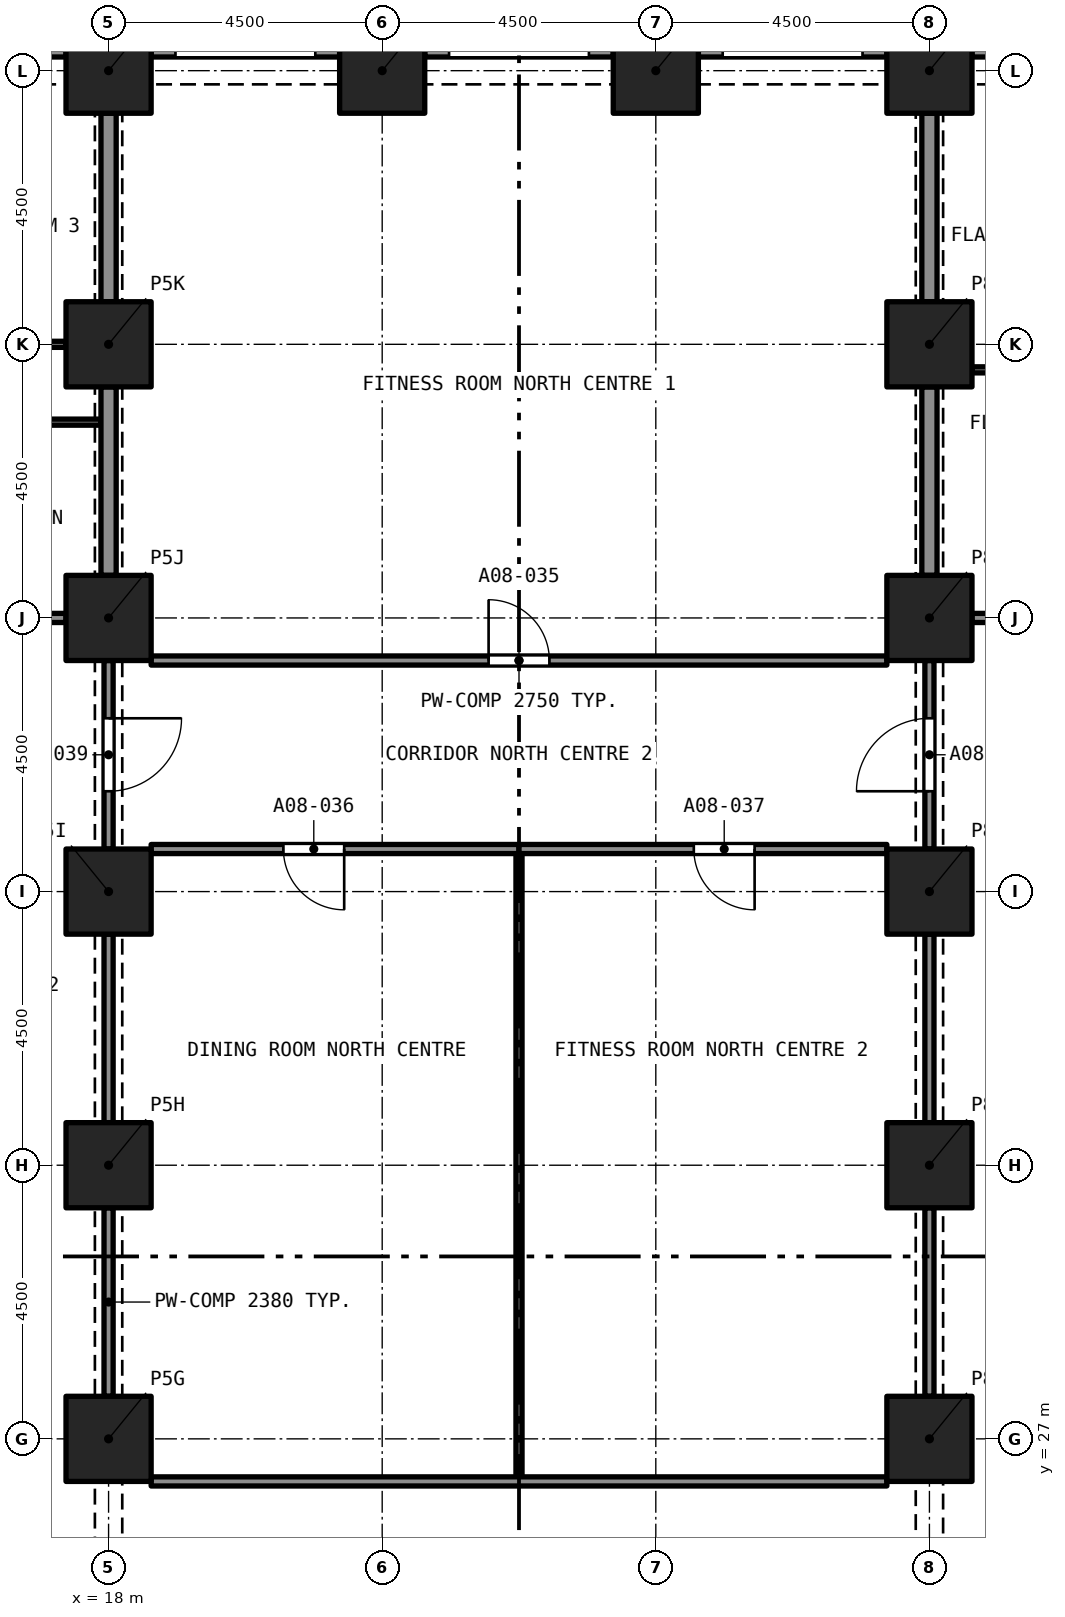
"""IFC4 building model, lengths in metres.
Left out: names, types, materials, properties, quantities, classifications, styles, units other than length and angle.
Written with IfcOpenShell. Run it as: python <this file> out.ifc"""

import sys

from ifc_helpers import new_model, si_unit, direction, frame, frame_2d, origin, origin_2d, place, context, subcontext, project, spatial, rectangle, extrude, element, fill, save


model = new_model("IFC4")
c1 = context("Model", 3, precision=1e-05, world=origin(), true_north=direction((0.0, 1.0)))
c2 = subcontext(c1, "Body", "Model", "MODEL_VIEW")
j1 = project(units=[si_unit("LENGTHUNIT", "METRE"), si_unit("PLANEANGLEUNIT", "RADIAN")], contexts=[c1])
p1 = place(None, origin())
s1 = spatial("IfcSite", under=j1, at=p1, CompositionType="ELEMENT")
p2 = place(p1, origin())
s2 = spatial("IfcBuilding", under=s1, at=p2, CompositionType="ELEMENT")
p3 = place(p2, frame((0.0, 0.0, 36.8)))
s3 = spatial("IfcBuildingStorey", under=s2, at=p3, CompositionType="ELEMENT", Elevation=36.8)
for number, where, z_axis, x_axis in (
    (1, (18.0, 27.0, 0.0), (0.0, 0.0, 1.0), (1.0, 0.0, 0.0)),
    (2, (31.5, 27.0, 0.0), (0.0, 0.0, 1.0), (1.0, 0.0, 0.0)),
    (3, (18.0, 31.5, 0.0), (0.0, 0.0, 1.0), (1.0, 0.0, 0.0)),
    (4, (31.5, 31.5, 0.0), (0.0, 0.0, 1.0), (1.0, 0.0, 0.0)),
    (5, (18.0, 36.0, 0.0), (0.0, 0.0, 1.0), (1.0, 0.0, 0.0)),
    (6, (31.5, 36.0, 0.0), (0.0, 0.0, 1.0), (1.0, 0.0, 0.0)),
    (7, (18.0, 40.5, 0.0), (0.0, 0.0, 1.0), (1.0, 0.0, 0.0)),
    (8, (31.5, 40.5, 0.0), (0.0, 0.0, 1.0), (1.0, 0.0, 0.0)),
    (9, (18.0, 45.0, 0.0), (0.0, 0.0, 1.0), (1.0, 0.0, 0.0)),
    (10, (31.5, 45.0, 0.0), (0.0, 0.0, 1.0), (1.0, 0.0, 0.0)),
    (11, (18.0, 49.5, 0.0), (0.0, 0.0, 1.0), (1.0, 0.0, 0.0)),
    (12, (22.5, 49.5, 0.0), (0.0, 0.0, 1.0), (1.0, 0.0, 0.0)),
    (13, (27.0, 49.5, 0.0), (0.0, 0.0, 1.0), (1.0, 0.0, 0.0)),
    (14, (31.5, 49.5, 0.0), (0.0, 0.0, 1.0), (1.0, 0.0, 0.0)),
):
    element("IfcColumn", number, at=place(p3, frame(where, z_axis=z_axis, x_axis=x_axis)), inside=s3, PredefinedType="COLUMN", context=c2, shape_type="SweptSolid", body=[
        extrude(rectangle(XDim=1.4, YDim=1.4, at=origin_2d()), origin(), (0.0, 0.0, 1.0), 3.2),
    ])
p4 = place(p3, frame((32.2, 49.875, 0.0), z_axis=(0.0, 0.0, 1.0), x_axis=(1.0, 0.0, 0.0)))
e15 = element("IfcWall", 15, at=p4, inside=s3, PredefinedType="SOLIDWALL", context=c2, shape_type="SweptSolid", body=[
    extrude(rectangle(XDim=3.1, YDim=0.3, at=frame_2d((1.55, 0.0))), origin(), (0.0, 0.0, 1.0), 3.2),
])
p5 = place(p4, frame((0.4, 0.0, 0.45)))
e16 = element("IfcOpeningElement", 16, at=p5, cuts=e15, PredefinedType="OPENING", context=c2, shape_type="SweptSolid", body=[
    extrude(rectangle(XDim=2.3, YDim=1.95, at=frame_2d((1.15, 0.975))), frame((0.0, 0.16, 0.0), z_axis=(0.0, -1.0, 0.0), x_axis=(1.0, 0.0, 0.0)), (0.0, 0.0, 1.0), 0.32),
])
p6 = place(p3, frame((27.7, 49.875, 0.0), z_axis=(0.0, 0.0, 1.0), x_axis=(1.0, 0.0, 0.0)))
e17 = element("IfcWall", 17, at=p6, inside=s3, PredefinedType="SOLIDWALL", context=c2, shape_type="SweptSolid", body=[
    extrude(rectangle(XDim=3.1, YDim=0.3, at=frame_2d((1.55, 0.0))), origin(), (0.0, 0.0, 1.0), 3.2),
])
p7 = place(p6, frame((0.4, 0.0, 0.45)))
e18 = element("IfcOpeningElement", 18, at=p7, cuts=e17, PredefinedType="OPENING", context=c2, shape_type="SweptSolid", body=[
    extrude(rectangle(XDim=2.3, YDim=1.95, at=frame_2d((1.15, 0.975))), frame((0.0, 0.16, 0.0), z_axis=(0.0, -1.0, 0.0), x_axis=(1.0, 0.0, 0.0)), (0.0, 0.0, 1.0), 0.32),
])
p8 = place(p3, frame((23.2, 49.875, 0.0), z_axis=(0.0, 0.0, 1.0), x_axis=(1.0, 0.0, 0.0)))
e19 = element("IfcWall", 19, at=p8, inside=s3, PredefinedType="SOLIDWALL", context=c2, shape_type="SweptSolid", body=[
    extrude(rectangle(XDim=3.1, YDim=0.3, at=frame_2d((1.55, 0.0))), origin(), (0.0, 0.0, 1.0), 3.2),
])
p9 = place(p8, frame((0.4, 0.0, 0.45)))
e20 = element("IfcOpeningElement", 20, at=p9, cuts=e19, PredefinedType="OPENING", context=c2, shape_type="SweptSolid", body=[
    extrude(rectangle(XDim=2.3, YDim=1.95, at=frame_2d((1.15, 0.975))), frame((0.0, 0.16, 0.0), z_axis=(0.0, -1.0, 0.0), x_axis=(1.0, 0.0, 0.0)), (0.0, 0.0, 1.0), 0.32),
])
p10 = place(p3, frame((18.7, 49.875, 0.0), z_axis=(0.0, 0.0, 1.0), x_axis=(1.0, 0.0, 0.0)))
e21 = element("IfcWall", 21, at=p10, inside=s3, PredefinedType="SOLIDWALL", context=c2, shape_type="SweptSolid", body=[
    extrude(rectangle(XDim=3.1, YDim=0.3, at=frame_2d((1.55, 0.0))), origin(), (0.0, 0.0, 1.0), 3.2),
])
p11 = place(p10, frame((0.4, 0.0, 0.45)))
e22 = element("IfcOpeningElement", 22, at=p11, cuts=e21, PredefinedType="OPENING", context=c2, shape_type="SweptSolid", body=[
    extrude(rectangle(XDim=2.3, YDim=1.95, at=frame_2d((1.15, 0.975))), frame((0.0, 0.16, 0.0), z_axis=(0.0, -1.0, 0.0), x_axis=(1.0, 0.0, 0.0)), (0.0, 0.0, 1.0), 0.32),
])
p12 = place(p3, frame((14.2, 49.875, 0.0), z_axis=(0.0, 0.0, 1.0), x_axis=(1.0, 0.0, 0.0)))
e23 = element("IfcWall", 23, at=p12, inside=s3, PredefinedType="SOLIDWALL", context=c2, shape_type="SweptSolid", body=[
    extrude(rectangle(XDim=3.1, YDim=0.3, at=frame_2d((1.55, 0.0))), origin(), (0.0, 0.0, 1.0), 3.2),
])
p13 = place(p12, frame((0.4, 0.0, 0.45)))
e24 = element("IfcOpeningElement", 24, at=p13, cuts=e23, PredefinedType="OPENING", context=c2, shape_type="SweptSolid", body=[
    extrude(rectangle(XDim=2.3, YDim=1.95, at=frame_2d((1.15, 0.975))), frame((0.0, 0.16, 0.0), z_axis=(0.0, -1.0, 0.0), x_axis=(1.0, 0.0, 0.0)), (0.0, 0.0, 1.0), 0.32),
])
p14 = place(p3, frame((13.5, 45.0, 0.0), z_axis=(0.0, 0.0, 1.0), x_axis=(1.0, 0.0, 0.0)))
e25 = element("IfcWall", 25, at=p14, inside=s3, PredefinedType="PARTITIONING", context=c2, shape_type="SweptSolid", body=[
    extrude(rectangle(XDim=3.8, YDim=0.1, at=frame_2d((1.9, 0.0))), origin(), (0.0, 0.0, 1.0), 2.9),
])
p15 = place(p14, frame((1.8, 0.0, 0.0)))
e26 = element("IfcOpeningElement", 26, at=p15, cuts=e25, PredefinedType="OPENING", context=c2, shape_type="SweptSolid", body=[
    extrude(rectangle(XDim=0.9, YDim=2.1, at=frame_2d((0.45, 1.05))), frame((0.0, 0.06, 0.0), z_axis=(0.0, -1.0, 0.0), x_axis=(1.0, 0.0, 0.0)), (0.0, 0.0, 1.0), 0.12),
])
p16 = place(p3, frame((18.0, 45.7, 0.0), z_axis=(0.0, 0.0, 1.0), x_axis=(0.0, 1.0, 0.0)))
e27 = element("IfcWall", 27, at=p16, inside=s3, PredefinedType="PARTITIONING", context=c2, shape_type="SweptSolid", body=[
    extrude(rectangle(XDim=3.1, YDim=0.25, at=frame_2d((1.55, 0.0))), origin(), (0.0, 0.0, 1.0), 2.38),
])
p17 = place(p3, frame((17.875, 43.72, 0.0), z_axis=(0.0, 0.0, 1.0), x_axis=(-1.0, 0.0, 0.0)))
e28 = element("IfcWall", 28, at=p17, inside=s3, PredefinedType="PARTITIONING", context=c2, shape_type="SweptSolid", body=[
    extrude(rectangle(XDim=6.147, YDim=0.1, at=frame_2d((3.073, 0.0))), origin(), (0.0, 0.0, 1.0), 2.9),
])
p18 = place(p17, frame((2.561, 0.0, 0.0)))
e29 = element("IfcOpeningElement", 29, at=p18, cuts=e28, PredefinedType="OPENING", context=c2, shape_type="SweptSolid", body=[
    extrude(rectangle(XDim=0.9, YDim=2.1, at=frame_2d((0.45, 1.05))), frame((0.0, 0.06, 0.0), z_axis=(0.0, -1.0, 0.0), x_axis=(1.0, 0.0, 0.0)), (0.0, 0.0, 1.0), 0.12),
])
p19 = place(p3, frame((18.0, 41.2, 0.0), z_axis=(0.0, 0.0, 1.0), x_axis=(0.0, 1.0, 0.0)))
e30 = element("IfcWall", 30, at=p19, inside=s3, PredefinedType="PARTITIONING", context=c2, shape_type="SweptSolid", body=[
    extrude(rectangle(XDim=3.1, YDim=0.25, at=frame_2d((1.55, 0.0))), origin(), (0.0, 0.0, 1.0), 2.38),
])
p20 = place(p3, frame((13.5, 40.5, 0.0), z_axis=(0.0, 0.0, 1.0), x_axis=(1.0, 0.0, 0.0)))
e31 = element("IfcWall", 31, at=p20, inside=s3, PredefinedType="PARTITIONING", context=c2, shape_type="SweptSolid", body=[
    extrude(rectangle(XDim=3.8, YDim=0.15, at=frame_2d((1.9, 0.0))), origin(), (0.0, 0.0, 1.0), 2.9),
])
p21 = place(p3, frame((32.2, 44.58, 0.0), z_axis=(0.0, 0.0, 1.0), x_axis=(1.0, 0.0, 0.0)))
e32 = element("IfcWall", 32, at=p21, inside=s3, PredefinedType="PARTITIONING", context=c2, shape_type="SweptSolid", body=[
    extrude(rectangle(XDim=3.8, YDim=0.1, at=frame_2d((1.9, 0.0))), origin(), (0.0, 0.0, 1.0), 2.9),
])
p22 = place(p21, frame((1.05, 0.0, 0.0)))
e33 = element("IfcOpeningElement", 33, at=p22, cuts=e32, PredefinedType="OPENING", context=c2, shape_type="SweptSolid", body=[
    extrude(rectangle(XDim=1.0, YDim=2.1, at=frame_2d((0.5, 1.05))), frame((0.0, 0.06, 0.0), z_axis=(0.0, -1.0, 0.0), x_axis=(1.0, 0.0, 0.0)), (0.0, 0.0, 1.0), 0.12),
])
p23 = place(p3, frame((31.5, 41.2, 0.0), z_axis=(0.0, 0.0, 1.0), x_axis=(0.0, 1.0, 0.0)))
e34 = element("IfcWall", 34, at=p23, inside=s3, PredefinedType="PARTITIONING", context=c2, shape_type="SweptSolid", body=[
    extrude(rectangle(XDim=3.1, YDim=0.25, at=frame_2d((1.55, 0.0))), origin(), (0.0, 0.0, 1.0), 2.38),
])
p24 = place(p3, frame((32.2, 40.5, 0.0), z_axis=(0.0, 0.0, 1.0), x_axis=(1.0, 0.0, 0.0)))
e35 = element("IfcWall", 35, at=p24, inside=s3, PredefinedType="PARTITIONING", context=c2, shape_type="SweptSolid", body=[
    extrude(rectangle(XDim=2.225, YDim=0.15, at=frame_2d((1.113, 0.0))), origin(), (0.0, 0.0, 1.0), 2.9),
])
p25 = place(p24, frame((1.05, 0.0, 0.0)))
e36 = element("IfcOpeningElement", 36, at=p25, cuts=e35, PredefinedType="OPENING", context=c2, shape_type="SweptSolid", body=[
    extrude(rectangle(XDim=1.0, YDim=2.1, at=frame_2d((0.5, 1.05))), frame((0.0, 0.085, 0.0), z_axis=(0.0, -1.0, 0.0), x_axis=(1.0, 0.0, 0.0)), (0.0, 0.0, 1.0), 0.17),
])
p26 = place(p3, frame((31.5, 45.7, 0.0), z_axis=(0.0, 0.0, 1.0), x_axis=(0.0, 1.0, 0.0)))
e37 = element("IfcWall", 37, at=p26, inside=s3, PredefinedType="PARTITIONING", context=c2, shape_type="SweptSolid", body=[
    extrude(rectangle(XDim=3.1, YDim=0.25, at=frame_2d((1.55, 0.0))), origin(), (0.0, 0.0, 1.0), 2.38),
])
p27 = place(p3, frame((18.7, 39.8, 0.0), z_axis=(0.0, 0.0, 1.0), x_axis=(1.0, 0.0, 0.0)))
e38 = element("IfcWall", 38, at=p27, inside=s3, PredefinedType="PARTITIONING", context=c2, shape_type="SweptSolid", body=[
    extrude(rectangle(XDim=12.1, YDim=0.15, at=frame_2d((6.05, 0.0))), origin(), (0.0, 0.0, 1.0), 2.75),
])
p28 = place(p27, frame((5.55, 0.0, 0.0)))
e39 = element("IfcOpeningElement", 39, at=p28, cuts=e38, PredefinedType="OPENING", context=c2, shape_type="SweptSolid", body=[
    extrude(rectangle(XDim=1.0, YDim=2.1, at=frame_2d((0.5, 1.05))), frame((0.0, 0.085, 0.0), z_axis=(0.0, -1.0, 0.0), x_axis=(1.0, 0.0, 0.0)), (0.0, 0.0, 1.0), 0.17),
])
p29 = place(p3, frame((24.75, 36.7, 0.0), z_axis=(0.0, 0.0, 1.0), x_axis=(-1.0, 0.0, 0.0)))
e40 = element("IfcWall", 40, at=p29, inside=s3, PredefinedType="PARTITIONING", context=c2, shape_type="SweptSolid", body=[
    extrude(rectangle(XDim=6.05, YDim=0.15, at=frame_2d((3.025, 0.0))), origin(), (0.0, 0.0, 1.0), 2.75),
])
p30 = place(p29, frame((2.875, 0.0, 0.0)))
e41 = element("IfcOpeningElement", 41, at=p30, cuts=e40, PredefinedType="OPENING", context=c2, shape_type="SweptSolid", body=[
    extrude(rectangle(XDim=1.0, YDim=2.1, at=frame_2d((0.5, 1.05))), frame((0.0, 0.085, 0.0), z_axis=(0.0, -1.0, 0.0), x_axis=(1.0, 0.0, 0.0)), (0.0, 0.0, 1.0), 0.17),
])
p31 = place(p3, frame((30.8, 36.7, 0.0), z_axis=(0.0, 0.0, 1.0), x_axis=(-1.0, 0.0, 0.0)))
e42 = element("IfcWall", 42, at=p31, inside=s3, PredefinedType="PARTITIONING", context=c2, shape_type="SweptSolid", body=[
    extrude(rectangle(XDim=6.05, YDim=0.15, at=frame_2d((3.025, 0.0))), origin(), (0.0, 0.0, 1.0), 2.75),
])
p32 = place(p31, frame((2.175, 0.0, 0.0)))
e43 = element("IfcOpeningElement", 43, at=p32, cuts=e42, PredefinedType="OPENING", context=c2, shape_type="SweptSolid", body=[
    extrude(rectangle(XDim=1.0, YDim=2.1, at=frame_2d((0.5, 1.05))), frame((0.0, 0.085, 0.0), z_axis=(0.0, -1.0, 0.0), x_axis=(1.0, 0.0, 0.0)), (0.0, 0.0, 1.0), 0.17),
])
p33 = place(p3, frame((31.5, 36.7, 0.0), z_axis=(0.0, 0.0, 1.0), x_axis=(0.0, 1.0, 0.0)))
e44 = element("IfcWall", 44, at=p33, inside=s3, PredefinedType="PARTITIONING", context=c2, shape_type="SweptSolid", body=[
    extrude(rectangle(XDim=3.1, YDim=0.15, at=frame_2d((1.55, 0.0))), origin(), (0.0, 0.0, 1.0), 2.38),
])
p34 = place(p33, frame((0.95, 0.0, 0.0)))
e45 = element("IfcOpeningElement", 45, at=p34, cuts=e44, PredefinedType="OPENING", context=c2, shape_type="SweptSolid", body=[
    extrude(rectangle(XDim=1.2, YDim=2.1, at=frame_2d((0.6, 1.05))), frame((0.0, 0.085, 0.0), z_axis=(0.0, -1.0, 0.0), x_axis=(1.0, 0.0, 0.0)), (0.0, 0.0, 1.0), 0.17),
])
p35 = place(p3, frame((18.0, 39.8, 0.0), z_axis=(0.0, 0.0, 1.0), x_axis=(0.0, -1.0, 0.0)))
e46 = element("IfcWall", 46, at=p35, inside=s3, PredefinedType="PARTITIONING", context=c2, shape_type="SweptSolid", body=[
    extrude(rectangle(XDim=3.1, YDim=0.15, at=frame_2d((1.55, 0.0))), origin(), (0.0, 0.0, 1.0), 2.38),
])
p36 = place(p35, frame((0.95, 0.0, 0.0)))
e47 = element("IfcOpeningElement", 47, at=p36, cuts=e46, PredefinedType="OPENING", context=c2, shape_type="SweptSolid", body=[
    extrude(rectangle(XDim=1.2, YDim=2.1, at=frame_2d((0.6, 1.05))), frame((0.0, 0.085, 0.0), z_axis=(0.0, -1.0, 0.0), x_axis=(1.0, 0.0, 0.0)), (0.0, 0.0, 1.0), 0.17),
])
p37 = place(p3, frame((24.75, 26.375, 0.0), z_axis=(0.0, 0.0, 1.0), x_axis=(0.0, 1.0, 0.0)))
e48 = element("IfcWall", 48, at=p37, inside=s3, PredefinedType="PARTITIONING", context=c2, shape_type="SweptSolid", body=[
    extrude(rectangle(XDim=10.25, YDim=0.1, at=frame_2d((5.125, 0.0))), origin(), (0.0, 0.0, 1.0), 2.75),
])
for number, where, z_axis, x_axis in (
    (49, (18.0, 27.7, 0.0), (0.0, 0.0, 1.0), (0.0, 1.0, 0.0)),
    (50, (18.0, 32.2, 0.0), (0.0, 0.0, 1.0), (0.0, 1.0, 0.0)),
):
    element("IfcWall", number, at=place(p3, frame(where, z_axis=z_axis, x_axis=x_axis)), inside=s3, PredefinedType="PARTITIONING", context=c2, shape_type="SweptSolid", body=[
        extrude(rectangle(XDim=3.1, YDim=0.15, at=frame_2d((1.55, 0.0))), origin(), (0.0, 0.0, 1.0), 2.38),
    ])
p38 = place(p3, frame((18.7, 26.3, 0.0), z_axis=(0.0, 0.0, 1.0), x_axis=(1.0, 0.0, 0.0)))
e51 = element("IfcWall", 51, at=p38, inside=s3, PredefinedType="PARTITIONING", context=c2, shape_type="SweptSolid", body=[
    extrude(rectangle(XDim=12.1, YDim=0.15, at=frame_2d((6.05, 0.0))), origin(), (0.0, 0.0, 1.0), 2.75),
])
for number, where, z_axis, x_axis in (
    (52, (31.5, 32.2, 0.0), (0.0, 0.0, 1.0), (0.0, 1.0, 0.0)),
    (53, (31.5, 27.7, 0.0), (0.0, 0.0, 1.0), (0.0, 1.0, 0.0)),
):
    element("IfcWall", number, at=place(p3, frame(where, z_axis=z_axis, x_axis=x_axis)), inside=s3, PredefinedType="PARTITIONING", context=c2, shape_type="SweptSolid", body=[
        extrude(rectangle(XDim=3.1, YDim=0.15, at=frame_2d((1.55, 0.0))), origin(), (0.0, 0.0, 1.0), 2.38),
    ])
p39 = place(p28, origin())
e54 = element("IfcDoor", 54, at=p39, inside=s3, OperationType="SINGLE_SWING_RIGHT", PredefinedType="DOOR", context=c2, shape_type="SweptSolid", body=[
    extrude(rectangle(XDim=1.0, YDim=2.1, at=frame_2d((0.5, 1.05))), frame((0.0, 0.025, 0.0), z_axis=(0.0, -1.0, 0.0), x_axis=(1.0, 0.0, 0.0)), (0.0, 0.0, 1.0), 0.05),
])
fill(e39, e54)
p40 = place(p30, origin())
e55 = element("IfcDoor", 55, at=p40, inside=s3, OperationType="SINGLE_SWING_RIGHT", PredefinedType="DOOR", context=c2, shape_type="SweptSolid", body=[
    extrude(rectangle(XDim=1.0, YDim=2.1, at=frame_2d((0.5, 1.05))), frame((0.0, 0.025, 0.0), z_axis=(0.0, -1.0, 0.0), x_axis=(1.0, 0.0, 0.0)), (0.0, 0.0, 1.0), 0.05),
])
fill(e41, e55)
p41 = place(p32, origin())
e56 = element("IfcDoor", 56, at=p41, inside=s3, OperationType="SINGLE_SWING_LEFT", PredefinedType="DOOR", context=c2, shape_type="SweptSolid", body=[
    extrude(rectangle(XDim=1.0, YDim=2.1, at=frame_2d((0.5, 1.05))), frame((0.0, 0.025, 0.0), z_axis=(0.0, -1.0, 0.0), x_axis=(1.0, 0.0, 0.0)), (0.0, 0.0, 1.0), 0.05),
])
fill(e43, e56)
p42 = place(p34, origin())
e57 = element("IfcDoor", 57, at=p42, inside=s3, OperationType="SINGLE_SWING_LEFT", PredefinedType="DOOR", context=c2, shape_type="SweptSolid", body=[
    extrude(rectangle(XDim=1.2, YDim=2.1, at=frame_2d((0.6, 1.05))), frame((0.0, 0.025, 0.0), z_axis=(0.0, -1.0, 0.0), x_axis=(1.0, 0.0, 0.0)), (0.0, 0.0, 1.0), 0.05),
])
fill(e45, e57)
p43 = place(p36, origin())
e58 = element("IfcDoor", 58, at=p43, inside=s3, OperationType="SINGLE_SWING_LEFT", PredefinedType="DOOR", context=c2, shape_type="SweptSolid", body=[
    extrude(rectangle(XDim=1.2, YDim=2.1, at=frame_2d((0.6, 1.05))), frame((0.0, 0.025, 0.0), z_axis=(0.0, -1.0, 0.0), x_axis=(1.0, 0.0, 0.0)), (0.0, 0.0, 1.0), 0.05),
])
fill(e47, e58)
save(model, sys.argv[1])
